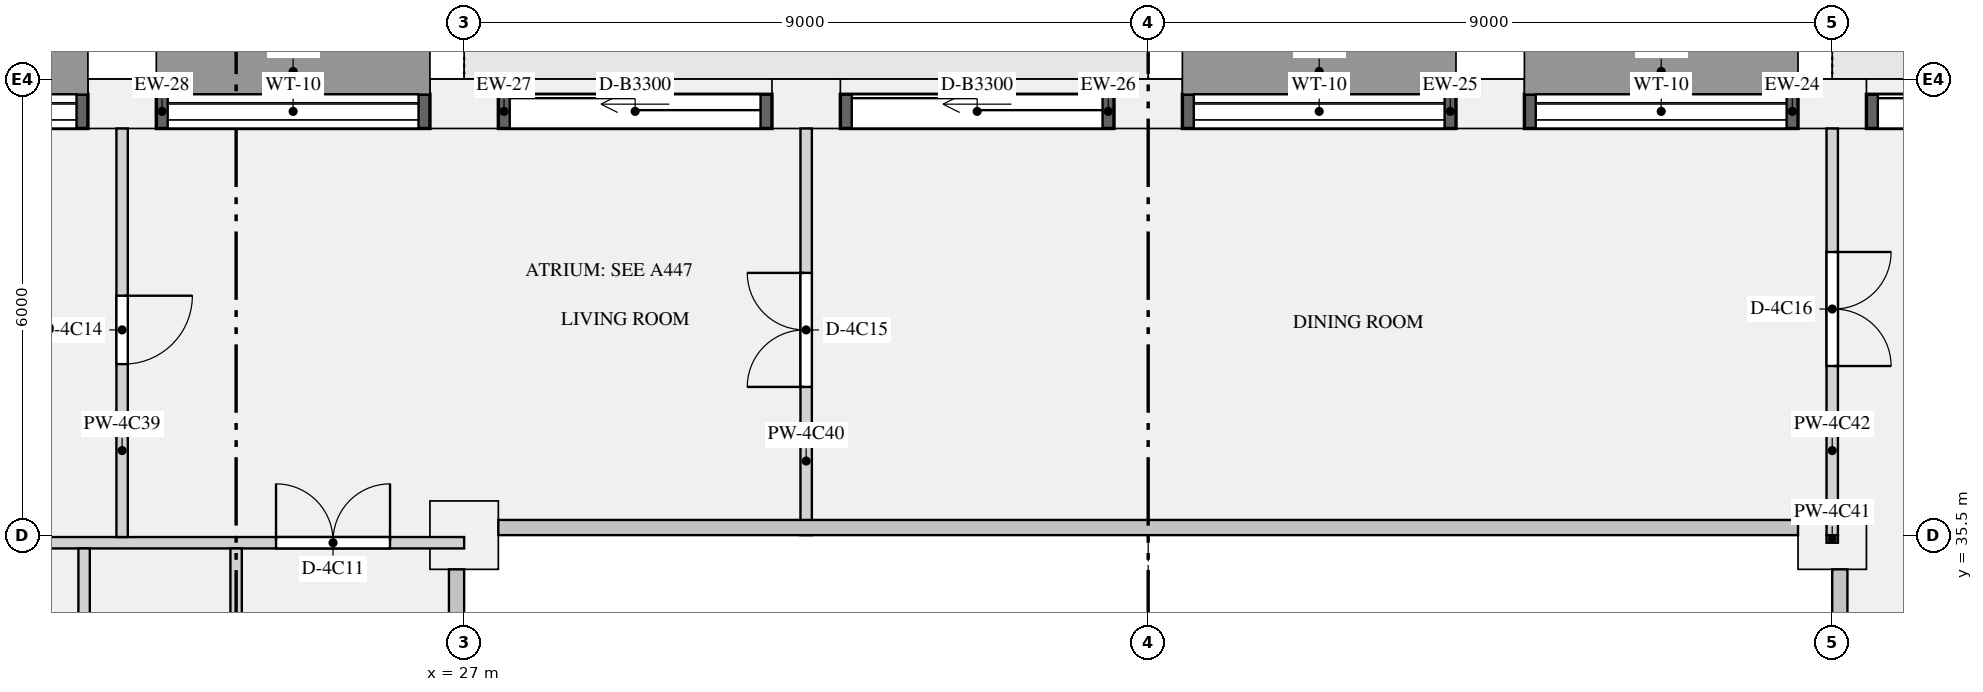
"""IFC4 building model, lengths in metres.
Left out: names, types, materials, properties, quantities, classifications, styles, units other than length and angle.
Written with IfcOpenShell. Run it as: python <this file> out.ifc"""

import sys

from ifc_helpers import new_model, si_unit, direction, frame, frame_2d, origin, origin_2d, place, context, subcontext, project, spatial, rectangle, extrude, element, fill, save


model = new_model("IFC4")
c1 = context("Model", 3, precision=1e-05, world=origin(), true_north=direction((0.0, 1.0)))
c2 = subcontext(c1, "Body", "Model", "MODEL_VIEW")
j1 = project(units=[si_unit("LENGTHUNIT", "METRE"), si_unit("PLANEANGLEUNIT", "RADIAN")], contexts=[c1])
p1 = place(None, origin())
s1 = spatial("IfcSite", under=j1, at=p1, CompositionType="ELEMENT")
p2 = place(p1, origin())
s2 = spatial("IfcBuilding", under=s1, at=p2, CompositionType="ELEMENT")
p3 = place(p2, frame((0.0, 0.0, 216.9)))
s3 = spatial("IfcBuildingStorey", under=s2, at=p3, CompositionType="ELEMENT", Elevation=216.9)
for number, where, z_axis, x_axis in (
    (1, (45.0, 41.175, 0.0), (0.0, 0.0, 1.0), (-1.0, 0.0, 0.0)),
    (2, (40.5, 41.175, 0.0), (0.0, 0.0, 1.0), (-1.0, 0.0, 0.0)),
    (3, (36.0, 41.175, 0.0), (0.0, 0.0, 1.0), (-1.0, 0.0, 0.0)),
    (4, (31.5, 41.175, 0.0), (0.0, 0.0, 1.0), (-1.0, 0.0, 0.0)),
    (5, (27.0, 41.175, 0.0), (0.0, 0.0, 1.0), (-1.0, 0.0, 0.0)),
    (6, (22.5, 41.175, 0.0), (0.0, 0.0, 1.0), (-1.0, 0.0, 0.0)),
):
    element("IfcColumn", number, at=place(p3, frame(where, z_axis=z_axis, x_axis=x_axis)), inside=s3, PredefinedType="USERDEFINED", context=c2, shape_type="SweptSolid", body=[
        extrude(rectangle(XDim=0.9, YDim=0.65, at=origin_2d()), origin(), (0.0, 0.0, 1.0), 3.15),
    ])
for number, where, z_axis, x_axis in (
    (7, (27.0, 35.5, 0.0), (0.0, 0.0, 1.0), (1.0, 0.0, 0.0)),
    (8, (45.0, 35.5, 0.0), (0.0, 0.0, 1.0), (1.0, 0.0, 0.0)),
):
    element("IfcColumn", number, at=place(p3, frame(where, z_axis=z_axis, x_axis=x_axis)), inside=s3, PredefinedType="COLUMN", context=c2, shape_type="SweptSolid", body=[
        extrude(rectangle(XDim=0.9, YDim=0.9, at=origin_2d()), origin(), (0.0, 0.0, 1.0), 3.15),
    ])
p4 = place(p3, frame((49.05, 41.075, 0.0), z_axis=(0.0, 0.0, 1.0), x_axis=(-1.0, 0.0, 0.0)))
e9 = element("IfcWall", 9, at=p4, inside=s3, PredefinedType="SOLIDWALL", context=c2, shape_type="SweptSolid", body=[
    extrude(rectangle(XDim=3.6, YDim=0.45, at=frame_2d((1.8, 0.0))), origin(), (0.0, 0.0, 1.0), 2.83),
])
p5 = place(p4, frame((0.15, 0.0, 0.0)))
e10 = element("IfcOpeningElement", 10, at=p5, cuts=e9, PredefinedType="OPENING", context=c2, shape_type="SweptSolid", body=[
    extrude(rectangle(XDim=3.3, YDim=2.3, at=frame_2d((1.65, 1.15))), frame((0.0, 0.235, 0.0), z_axis=(0.0, -1.0, 0.0), x_axis=(1.0, 0.0, 0.0)), (0.0, 0.0, 1.0), 0.47),
])
p6 = place(p3, frame((44.55, 41.075, 0.9), z_axis=(0.0, 0.0, 1.0), x_axis=(-1.0, 0.0, 0.0)))
e11 = element("IfcWall", 11, at=p6, inside=s3, PredefinedType="SOLIDWALL", context=c2, shape_type="SweptSolid", body=[
    extrude(rectangle(XDim=3.6, YDim=0.45, at=frame_2d((1.8, 0.0))), origin(), (0.0, 0.0, 1.0), 1.93),
])
p7 = place(p6, frame((0.15, 0.0, 0.15)))
e12 = element("IfcOpeningElement", 12, at=p7, cuts=e11, PredefinedType="OPENING", context=c2, shape_type="SweptSolid", body=[
    extrude(rectangle(XDim=3.3, YDim=1.5, at=frame_2d((1.65, 0.75))), frame((0.0, 0.235, 0.0), z_axis=(0.0, -1.0, 0.0), x_axis=(1.0, 0.0, 0.0)), (0.0, 0.0, 1.0), 0.47),
])
p8 = place(p3, frame((40.05, 41.075, 0.9), z_axis=(0.0, 0.0, 1.0), x_axis=(-1.0, 0.0, 0.0)))
e13 = element("IfcWall", 13, at=p8, inside=s3, PredefinedType="SOLIDWALL", context=c2, shape_type="SweptSolid", body=[
    extrude(rectangle(XDim=3.6, YDim=0.45, at=frame_2d((1.8, 0.0))), origin(), (0.0, 0.0, 1.0), 1.93),
])
p9 = place(p8, frame((0.15, 0.0, 0.15)))
e14 = element("IfcOpeningElement", 14, at=p9, cuts=e13, PredefinedType="OPENING", context=c2, shape_type="SweptSolid", body=[
    extrude(rectangle(XDim=3.3, YDim=1.5, at=frame_2d((1.65, 0.75))), frame((0.0, 0.235, 0.0), z_axis=(0.0, -1.0, 0.0), x_axis=(1.0, 0.0, 0.0)), (0.0, 0.0, 1.0), 0.47),
])
p10 = place(p3, frame((35.55, 41.075, 0.0), z_axis=(0.0, 0.0, 1.0), x_axis=(-1.0, 0.0, 0.0)))
e15 = element("IfcWall", 15, at=p10, inside=s3, PredefinedType="SOLIDWALL", context=c2, shape_type="SweptSolid", body=[
    extrude(rectangle(XDim=3.6, YDim=0.45, at=frame_2d((1.8, 0.0))), origin(), (0.0, 0.0, 1.0), 2.83),
])
p11 = place(p10, frame((0.15, 0.0, 0.0)))
e16 = element("IfcOpeningElement", 16, at=p11, cuts=e15, PredefinedType="OPENING", context=c2, shape_type="SweptSolid", body=[
    extrude(rectangle(XDim=3.3, YDim=2.3, at=frame_2d((1.65, 1.15))), frame((0.0, 0.235, 0.0), z_axis=(0.0, -1.0, 0.0), x_axis=(1.0, 0.0, 0.0)), (0.0, 0.0, 1.0), 0.47),
])
p12 = place(p3, frame((31.05, 41.075, 0.0), z_axis=(0.0, 0.0, 1.0), x_axis=(-1.0, 0.0, 0.0)))
e17 = element("IfcWall", 17, at=p12, inside=s3, PredefinedType="SOLIDWALL", context=c2, shape_type="SweptSolid", body=[
    extrude(rectangle(XDim=3.6, YDim=0.45, at=frame_2d((1.8, 0.0))), origin(), (0.0, 0.0, 1.0), 2.83),
])
p13 = place(p12, frame((0.15, 0.0, 0.0)))
e18 = element("IfcOpeningElement", 18, at=p13, cuts=e17, PredefinedType="OPENING", context=c2, shape_type="SweptSolid", body=[
    extrude(rectangle(XDim=3.3, YDim=2.3, at=frame_2d((1.65, 1.15))), frame((0.0, 0.235, 0.0), z_axis=(0.0, -1.0, 0.0), x_axis=(1.0, 0.0, 0.0)), (0.0, 0.0, 1.0), 0.47),
])
p14 = place(p3, frame((26.55, 41.075, 0.9), z_axis=(0.0, 0.0, 1.0), x_axis=(-1.0, 0.0, 0.0)))
e19 = element("IfcWall", 19, at=p14, inside=s3, PredefinedType="SOLIDWALL", context=c2, shape_type="SweptSolid", body=[
    extrude(rectangle(XDim=3.6, YDim=0.45, at=frame_2d((1.8, 0.0))), origin(), (0.0, 0.0, 1.0), 1.93),
])
p15 = place(p14, frame((0.15, 0.0, 0.15)))
e20 = element("IfcOpeningElement", 20, at=p15, cuts=e19, PredefinedType="OPENING", context=c2, shape_type="SweptSolid", body=[
    extrude(rectangle(XDim=3.3, YDim=1.5, at=frame_2d((1.65, 0.75))), frame((0.0, 0.235, 0.0), z_axis=(0.0, -1.0, 0.0), x_axis=(1.0, 0.0, 0.0)), (0.0, 0.0, 1.0), 0.47),
])
p16 = place(p3, frame((22.05, 41.075, 0.9), z_axis=(0.0, 0.0, 1.0), x_axis=(-1.0, 0.0, 0.0)))
e21 = element("IfcWall", 21, at=p16, inside=s3, PredefinedType="SOLIDWALL", context=c2, shape_type="SweptSolid", body=[
    extrude(rectangle(XDim=3.6, YDim=0.45, at=frame_2d((1.8, 0.0))), origin(), (0.0, 0.0, 1.0), 1.93),
])
p17 = place(p16, frame((0.15, 0.0, 0.15)))
e22 = element("IfcOpeningElement", 22, at=p17, cuts=e21, PredefinedType="OPENING", context=c2, shape_type="SweptSolid", body=[
    extrude(rectangle(XDim=3.3, YDim=1.5, at=frame_2d((1.65, 0.75))), frame((0.0, 0.235, 0.0), z_axis=(0.0, -1.0, 0.0), x_axis=(1.0, 0.0, 0.0)), (0.0, 0.0, 1.0), 0.47),
])
p18 = place(p3, frame((15.8, 35.4, 0.0), z_axis=(0.0, 0.0, 1.0), x_axis=(1.0, 0.0, 0.0)))
e23 = element("IfcWall", 23, at=p18, inside=s3, PredefinedType="PARTITIONING", context=c2, shape_type="SweptSolid", body=[
    extrude(rectangle(XDim=11.2, YDim=0.15, at=frame_2d((5.6, 0.0))), origin(), (0.0, 0.0, 1.0), 2.83),
])
p19 = place(p18, frame((8.725, 0.0, 0.0)))
e24 = element("IfcOpeningElement", 24, at=p19, cuts=e23, PredefinedType="OPENING", context=c2, shape_type="SweptSolid", body=[
    extrude(rectangle(XDim=1.5, YDim=2.1, at=frame_2d((0.75, 1.05))), frame((0.0, 0.085, 0.0), z_axis=(0.0, -1.0, 0.0), x_axis=(1.0, 0.0, 0.0)), (0.0, 0.0, 1.0), 0.17),
])
p20 = place(p18, frame((3.975, 0.0, 0.0)))
e25 = element("IfcOpeningElement", 25, at=p20, cuts=e23, PredefinedType="OPENING", context=c2, shape_type="SweptSolid", body=[
    extrude(rectangle(XDim=0.9, YDim=2.1, at=frame_2d((0.45, 1.05))), frame((0.0, 0.085, 0.0), z_axis=(0.0, -1.0, 0.0), x_axis=(1.0, 0.0, 0.0)), (0.0, 0.0, 1.0), 0.17),
])
p21 = place(p3, frame((24.0, 27.1, 0.0), z_axis=(0.0, 0.0, 1.0), x_axis=(0.0, 1.0, 0.0)))
e26 = element("IfcWall", 26, at=p21, inside=s3, PredefinedType="PARTITIONING", context=c2, shape_type="SweptSolid", body=[
    extrude(rectangle(XDim=8.225, YDim=0.15, at=frame_2d((4.112, 0.0))), origin(), (0.0, 0.0, 1.0), 2.83),
])
p22 = place(p21, frame((0.95, 0.0, 0.0)))
e27 = element("IfcOpeningElement", 27, at=p22, cuts=e26, PredefinedType="OPENING", context=c2, shape_type="SweptSolid", body=[
    extrude(rectangle(XDim=0.9, YDim=2.1, at=frame_2d((0.45, 1.05))), frame((0.0, 0.085, 0.0), z_axis=(0.0, -1.0, 0.0), x_axis=(1.0, 0.0, 0.0)), (0.0, 0.0, 1.0), 0.17),
])
p23 = place(p21, frame((5.65, 0.0, 0.0)))
e28 = element("IfcOpeningElement", 28, at=p23, cuts=e26, PredefinedType="OPENING", context=c2, shape_type="SweptSolid", body=[
    extrude(rectangle(XDim=0.9, YDim=2.1, at=frame_2d((0.45, 1.05))), frame((0.0, 0.085, 0.0), z_axis=(0.0, -1.0, 0.0), x_axis=(1.0, 0.0, 0.0)), (0.0, 0.0, 1.0), 0.17),
])
p24 = place(p3, frame((22.0, 31.075, 0.0), z_axis=(0.0, 0.0, 1.0), x_axis=(0.0, 1.0, 0.0)))
e29 = element("IfcWall", 29, at=p24, inside=s3, PredefinedType="PARTITIONING", context=c2, shape_type="SweptSolid", body=[
    extrude(rectangle(XDim=4.25, YDim=0.15, at=frame_2d((2.125, 0.0))), origin(), (0.0, 0.0, 1.0), 2.83),
])
p25 = place(p3, frame((22.5, 35.475, 0.0), z_axis=(0.0, 0.0, 1.0), x_axis=(0.0, 1.0, 0.0)))
e30 = element("IfcWall", 30, at=p25, inside=s3, PredefinedType="PARTITIONING", context=c2, shape_type="SweptSolid", body=[
    extrude(rectangle(XDim=5.375, YDim=0.15, at=frame_2d((2.688, 0.0))), origin(), (0.0, 0.0, 1.0), 2.83),
])
p26 = place(p25, frame((2.275, 0.0, 0.0)))
e31 = element("IfcOpeningElement", 31, at=p26, cuts=e30, PredefinedType="OPENING", context=c2, shape_type="SweptSolid", body=[
    extrude(rectangle(XDim=0.9, YDim=2.1, at=frame_2d((0.45, 1.05))), frame((0.0, 0.085, 0.0), z_axis=(0.0, -1.0, 0.0), x_axis=(1.0, 0.0, 0.0)), (0.0, 0.0, 1.0), 0.17),
])
p27 = place(p3, frame((31.5, 35.5, 0.0), z_axis=(0.0, 0.0, 1.0), x_axis=(0.0, 1.0, 0.0)))
e32 = element("IfcWall", 32, at=p27, inside=s3, PredefinedType="PARTITIONING", context=c2, shape_type="SweptSolid", body=[
    extrude(rectangle(XDim=5.35, YDim=0.15, at=frame_2d((2.675, 0.0))), origin(), (0.0, 0.0, 1.0), 2.83),
])
p28 = place(p27, frame((1.95, 0.0, 0.0)))
e33 = element("IfcOpeningElement", 33, at=p28, cuts=e32, PredefinedType="OPENING", context=c2, shape_type="SweptSolid", body=[
    extrude(rectangle(XDim=1.5, YDim=2.1, at=frame_2d((0.75, 1.05))), frame((0.0, 0.085, 0.0), z_axis=(0.0, -1.0, 0.0), x_axis=(1.0, 0.0, 0.0)), (0.0, 0.0, 1.0), 0.17),
])
p29 = place(p3, frame((45.0, 35.4, 0.0), z_axis=(0.0, 0.0, 1.0), x_axis=(0.0, 1.0, 0.0)))
e34 = element("IfcWall", 34, at=p29, inside=s3, PredefinedType="PARTITIONING", context=c2, shape_type="SweptSolid", body=[
    extrude(rectangle(XDim=0.1, YDim=0.15, at=frame_2d((0.05, 0.0))), origin(), (0.0, 0.0, 1.0), 2.83),
])
p30 = place(p3, frame((45.0, 35.5, 0.0), z_axis=(0.0, 0.0, 1.0), x_axis=(0.0, 1.0, 0.0)))
e35 = element("IfcWall", 35, at=p30, inside=s3, PredefinedType="PARTITIONING", context=c2, shape_type="SweptSolid", body=[
    extrude(rectangle(XDim=5.35, YDim=0.15, at=frame_2d((2.675, 0.0))), origin(), (0.0, 0.0, 1.0), 2.83),
])
p31 = place(p30, frame((2.225, 0.0, 0.0)))
e36 = element("IfcOpeningElement", 36, at=p31, cuts=e35, PredefinedType="OPENING", context=c2, shape_type="SweptSolid", body=[
    extrude(rectangle(XDim=1.5, YDim=2.1, at=frame_2d((0.75, 1.05))), frame((0.0, 0.085, 0.0), z_axis=(0.0, -1.0, 0.0), x_axis=(1.0, 0.0, 0.0)), (0.0, 0.0, 1.0), 0.17),
])
p32 = place(p5, origin())
e37 = element("IfcDoor", 37, at=p32, inside=s3, OperationType="SLIDING_TO_LEFT", PredefinedType="DOOR", context=c2, shape_type="SweptSolid", body=[
    extrude(rectangle(XDim=3.3, YDim=2.3, at=frame_2d((1.65, 1.15))), frame((0.0, -0.07, 0.0), z_axis=(0.0, -1.0, 0.0), x_axis=(1.0, 0.0, 0.0)), (0.0, 0.0, 1.0), 0.05),
])
fill(e10, e37)
p33 = place(p7, origin())
e38 = element("IfcWindow", 38, at=p33, inside=s3, PartitioningType="SINGLE_PANEL", PredefinedType="WINDOW", context=c2, shape_type="SweptSolid", body=[
    extrude(rectangle(XDim=3.3, YDim=1.5, at=frame_2d((1.65, 0.75))), frame((0.0, -0.065, 0.0), z_axis=(0.0, -1.0, 0.0), x_axis=(1.0, 0.0, 0.0)), (0.0, 0.0, 1.0), 0.06),
])
fill(e12, e38)
p34 = place(p9, origin())
e39 = element("IfcWindow", 39, at=p34, inside=s3, PartitioningType="SINGLE_PANEL", PredefinedType="WINDOW", context=c2, shape_type="SweptSolid", body=[
    extrude(rectangle(XDim=3.3, YDim=1.5, at=frame_2d((1.65, 0.75))), frame((0.0, -0.065, 0.0), z_axis=(0.0, -1.0, 0.0), x_axis=(1.0, 0.0, 0.0)), (0.0, 0.0, 1.0), 0.06),
])
fill(e14, e39)
p35 = place(p11, origin())
e40 = element("IfcDoor", 40, at=p35, inside=s3, OperationType="SLIDING_TO_LEFT", PredefinedType="DOOR", context=c2, shape_type="SweptSolid", body=[
    extrude(rectangle(XDim=3.3, YDim=2.3, at=frame_2d((1.65, 1.15))), frame((0.0, -0.07, 0.0), z_axis=(0.0, -1.0, 0.0), x_axis=(1.0, 0.0, 0.0)), (0.0, 0.0, 1.0), 0.05),
])
fill(e16, e40)
p36 = place(p13, origin())
e41 = element("IfcDoor", 41, at=p36, inside=s3, OperationType="SLIDING_TO_LEFT", PredefinedType="DOOR", context=c2, shape_type="SweptSolid", body=[
    extrude(rectangle(XDim=3.3, YDim=2.3, at=frame_2d((1.65, 1.15))), frame((0.0, -0.07, 0.0), z_axis=(0.0, -1.0, 0.0), x_axis=(1.0, 0.0, 0.0)), (0.0, 0.0, 1.0), 0.05),
])
fill(e18, e41)
p37 = place(p15, origin())
e42 = element("IfcWindow", 42, at=p37, inside=s3, PartitioningType="SINGLE_PANEL", PredefinedType="WINDOW", context=c2, shape_type="SweptSolid", body=[
    extrude(rectangle(XDim=3.3, YDim=1.5, at=frame_2d((1.65, 0.75))), frame((0.0, -0.065, 0.0), z_axis=(0.0, -1.0, 0.0), x_axis=(1.0, 0.0, 0.0)), (0.0, 0.0, 1.0), 0.06),
])
fill(e20, e42)
p38 = place(p17, origin())
e43 = element("IfcWindow", 43, at=p38, inside=s3, PartitioningType="SINGLE_PANEL", PredefinedType="WINDOW", context=c2, shape_type="SweptSolid", body=[
    extrude(rectangle(XDim=3.3, YDim=1.5, at=frame_2d((1.65, 0.75))), frame((0.0, -0.065, 0.0), z_axis=(0.0, -1.0, 0.0), x_axis=(1.0, 0.0, 0.0)), (0.0, 0.0, 1.0), 0.06),
])
fill(e22, e43)
p39 = place(p19, origin())
e44 = element("IfcDoor", 44, at=p39, inside=s3, OperationType="DOUBLE_DOOR_SINGLE_SWING", PredefinedType="DOOR", context=c2, shape_type="SweptSolid", body=[
    extrude(rectangle(XDim=1.5, YDim=2.1, at=frame_2d((0.75, 1.05))), frame((0.0, 0.025, 0.0), z_axis=(0.0, -1.0, 0.0), x_axis=(1.0, 0.0, 0.0)), (0.0, 0.0, 1.0), 0.05),
])
fill(e24, e44)
p40 = place(p26, frame((0.9, 0.0, 0.0), z_axis=(0.0, 0.0, 1.0), x_axis=(-1.0, 0.0, 0.0)))
e45 = element("IfcDoor", 45, at=p40, inside=s3, OperationType="SINGLE_SWING_LEFT", PredefinedType="DOOR", context=c2, shape_type="SweptSolid", body=[
    extrude(rectangle(XDim=0.9, YDim=2.1, at=frame_2d((0.45, 1.05))), frame((0.0, 0.025, 0.0), z_axis=(0.0, -1.0, 0.0), x_axis=(1.0, 0.0, 0.0)), (0.0, 0.0, 1.0), 0.05),
])
fill(e31, e45)
p41 = place(p28, origin())
e46 = element("IfcDoor", 46, at=p41, inside=s3, OperationType="DOUBLE_DOOR_SINGLE_SWING", PredefinedType="DOOR", context=c2, shape_type="SweptSolid", body=[
    extrude(rectangle(XDim=1.5, YDim=2.1, at=frame_2d((0.75, 1.05))), frame((0.0, 0.025, 0.0), z_axis=(0.0, -1.0, 0.0), x_axis=(1.0, 0.0, 0.0)), (0.0, 0.0, 1.0), 0.05),
])
fill(e33, e46)
p42 = place(p31, frame((1.5, 0.0, 0.0), z_axis=(0.0, 0.0, 1.0), x_axis=(-1.0, 0.0, 0.0)))
e47 = element("IfcDoor", 47, at=p42, inside=s3, OperationType="DOUBLE_DOOR_SINGLE_SWING", PredefinedType="DOOR", context=c2, shape_type="SweptSolid", body=[
    extrude(rectangle(XDim=1.5, YDim=2.1, at=frame_2d((0.75, 1.05))), frame((0.0, 0.025, 0.0), z_axis=(0.0, -1.0, 0.0), x_axis=(1.0, 0.0, 0.0)), (0.0, 0.0, 1.0), 0.05),
])
fill(e36, e47)
save(model, sys.argv[1])
